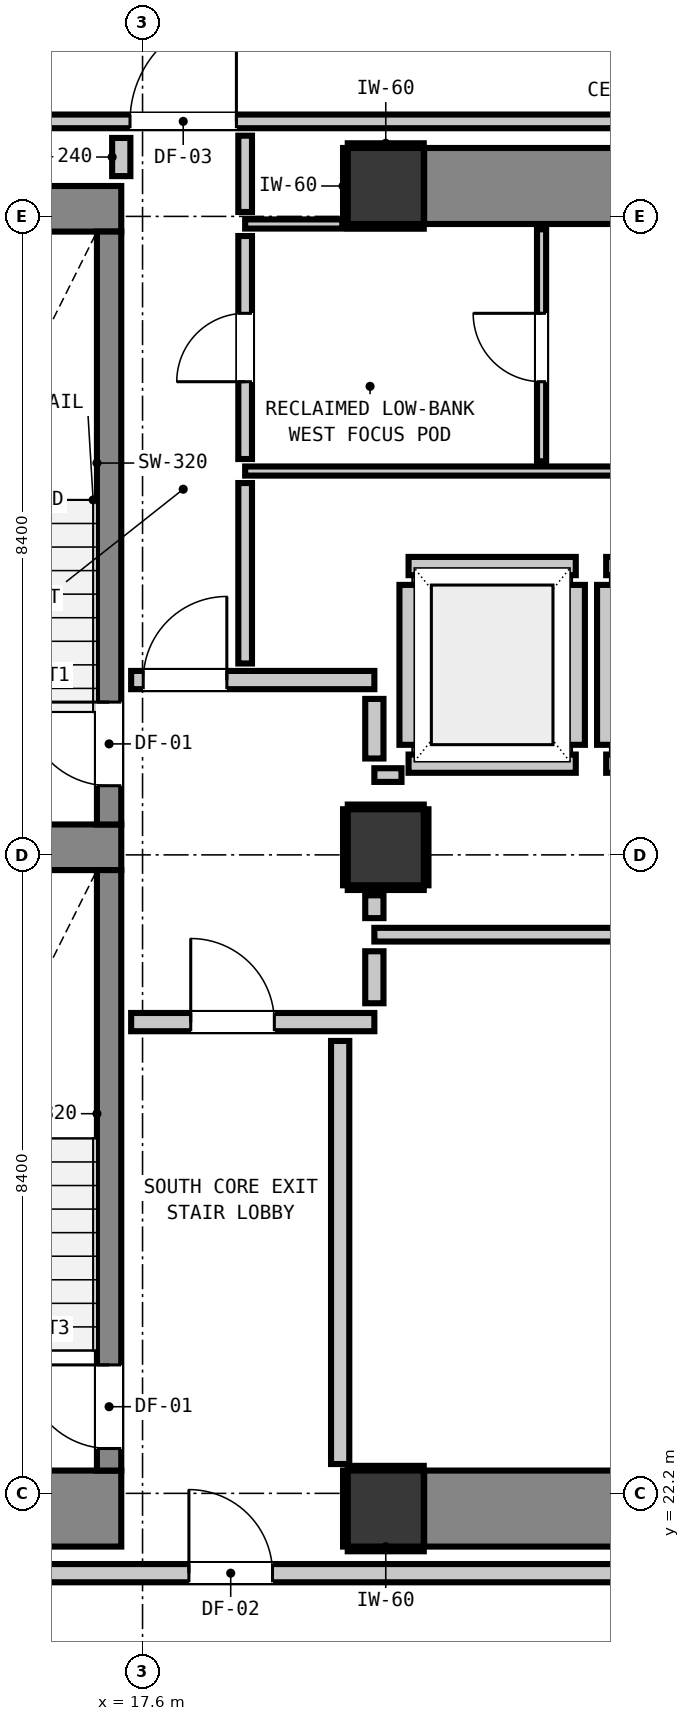
"""IFC4 building model, lengths in metres.
Left out: names, types, materials, properties, quantities, classifications, styles, units other than length and angle.
Written with IfcOpenShell. Run it as: python <this file> out.ifc"""

import sys

from ifc_helpers import new_model, si_unit, direction, frame, frame_2d, origin, origin_2d, place, context, subcontext, project, spatial, rectangle, extrude, element, fill, save


model = new_model("IFC4")
c1 = context("Model", 3, precision=1e-05, world=origin(), true_north=direction((0.0, 1.0)))
c2 = subcontext(c1, "Body", "Model", "MODEL_VIEW")
j1 = project(units=[si_unit("LENGTHUNIT", "METRE"), si_unit("PLANEANGLEUNIT", "RADIAN")], contexts=[c1])
p1 = place(None, origin())
s1 = spatial("IfcSite", under=j1, at=p1, CompositionType="ELEMENT")
p2 = place(p1, origin())
s2 = spatial("IfcBuilding", under=s1, at=p2, CompositionType="ELEMENT")
p3 = place(p2, frame((0.0, 0.0, 142.6)))
s3 = spatial("IfcBuildingStorey", under=s2, at=p3, CompositionType="ELEMENT", Elevation=142.6)
for number, where, z_axis, x_axis in (
    (1, (20.8, 22.0, 0.0), (0.0, 0.0, 1.0), (1.0, 0.0, 0.0)),
    (2, (20.8, 39.4, 0.0), (0.0, 0.0, 1.0), (1.0, 0.0, 0.0)),
):
    element("IfcColumn", number, at=place(p3, frame(where, z_axis=z_axis, x_axis=x_axis)), inside=s3, PredefinedType="COLUMN", context=c2, shape_type="SweptSolid", body=[
        extrude(rectangle(XDim=1.0, YDim=1.0, at=origin_2d()), origin(), (0.0, 0.0, 1.0), 3.32),
    ])
p4 = place(p3, frame((13.24, 22.0, 0.0), z_axis=(0.0, 0.0, 1.0), x_axis=(1.0, 0.0, 0.0)))
e3 = element("IfcWall", 3, at=p4, inside=s3, PredefinedType="SHEAR", context=c2, shape_type="SweptSolid", body=[
    extrude(rectangle(XDim=4.08, YDim=1.0, at=frame_2d((2.04, 0.0))), origin(), (0.0, 0.0, 1.0), 3.32),
])
p5 = place(p3, frame((13.24, 39.1, 0.0), z_axis=(0.0, 0.0, 1.0), x_axis=(1.0, 0.0, 0.0)))
e4 = element("IfcWall", 4, at=p5, inside=s3, PredefinedType="SHEAR", context=c2, shape_type="SweptSolid", body=[
    extrude(rectangle(XDim=4.08, YDim=0.6, at=frame_2d((2.04, 0.0))), origin(), (0.0, 0.0, 1.0), 3.32),
])
p6 = place(p3, frame((13.905, 30.7, 0.0), z_axis=(0.0, 0.0, 1.0), x_axis=(1.0, 0.0, 0.0)))
e5 = element("IfcWall", 5, at=p6, inside=s3, PredefinedType="SHEAR", context=c2, shape_type="SweptSolid", body=[
    extrude(rectangle(XDim=3.415, YDim=0.6, at=frame_2d((1.708, 0.0))), origin(), (0.0, 0.0, 1.0), 3.32),
])
for number, where, z_axis, x_axis in (
    (6, (21.305, 22.0, 0.0), (0.0, 0.0, 1.0), (1.0, 0.0, 0.0)),
    (7, (21.305, 39.4, 0.0), (0.0, 0.0, 1.0), (1.0, 0.0, 0.0)),
):
    element("IfcWall", number, at=place(p3, frame(where, z_axis=z_axis, x_axis=x_axis)), inside=s3, PredefinedType="SHEAR", context=c2, shape_type="SweptSolid", body=[
        extrude(rectangle(XDim=7.39, YDim=1.0, at=frame_2d((3.695, 0.0))), origin(), (0.0, 0.0, 1.0), 3.32),
    ])
p7 = place(p3, frame((17.16, 31.0, 0.0), z_axis=(0.0, 0.0, 1.0), x_axis=(0.0, 1.0, 0.0)))
e8 = element("IfcWall", 8, at=p7, inside=s3, PredefinedType="SHEAR", context=c2, shape_type="SweptSolid", body=[
    extrude(rectangle(XDim=7.8, YDim=0.32, at=frame_2d((3.9, 0.0))), origin(), (0.0, 0.0, 1.0), 3.32),
])
p8 = place(p7, frame((0.51, 0.0, 0.0)))
e9 = element("IfcOpeningElement", 9, at=p8, cuts=e8, PredefinedType="OPENING", context=c2, shape_type="SweptSolid", body=[
    extrude(rectangle(XDim=1.1, YDim=2.15, at=frame_2d((0.55, 1.075))), frame((0.0, 0.17, 0.0), z_axis=(0.0, -1.0, 0.0), x_axis=(1.0, 0.0, 0.0)), (0.0, 0.0, 1.0), 0.34),
])
p9 = place(p3, frame((17.16, 22.5, 0.0), z_axis=(0.0, 0.0, 1.0), x_axis=(0.0, 1.0, 0.0)))
e10 = element("IfcWall", 10, at=p9, inside=s3, PredefinedType="SHEAR", context=c2, shape_type="SweptSolid", body=[
    extrude(rectangle(XDim=7.9, YDim=0.32, at=frame_2d((3.95, 0.0))), origin(), (0.0, 0.0, 1.0), 3.32),
])
p10 = place(p9, frame((0.29, 0.0, 0.0)))
e11 = element("IfcOpeningElement", 11, at=p10, cuts=e10, PredefinedType="OPENING", context=c2, shape_type="SweptSolid", body=[
    extrude(rectangle(XDim=1.1, YDim=2.15, at=frame_2d((0.55, 1.075))), frame((0.0, 0.17, 0.0), z_axis=(0.0, -1.0, 0.0), x_axis=(1.0, 0.0, 0.0)), (0.0, 0.0, 1.0), 0.34),
])
p11 = place(p3, frame((20.8, 30.7, 0.0), z_axis=(0.0, 0.0, 1.0), x_axis=(1.0, 0.0, 0.0)))
e12 = element("IfcColumn", 12, at=p11, inside=s3, PredefinedType="COLUMN", context=c2, shape_type="SweptSolid", body=[
    extrude(rectangle(XDim=1.0, YDim=1.0, at=origin_2d()), origin(), (0.0, 0.0, 1.0), 3.32),
])
for number, where, z_axis, x_axis in (
    (13, (21.1, 31.8, 0.0), (0.0, 0.0, 1.0), (1.0, 0.0, 0.0)),
    (14, (21.1, 34.4, 0.0), (0.0, 0.0, 1.0), (1.0, 0.0, 0.0)),
):
    element("IfcWall", number, at=place(p3, frame(where, z_axis=z_axis, x_axis=x_axis)), inside=s3, PredefinedType="PARTITIONING", context=c2, shape_type="SweptSolid", body=[
        extrude(rectangle(XDim=2.2, YDim=0.24, at=frame_2d((1.1, 0.0))), origin(), (0.0, 0.0, 1.0), 2.9),
    ])
p12 = place(p3, frame((21.1, 32.048, 0.0), z_axis=(0.0, 0.0, 1.0), x_axis=(0.0, 1.0, 0.0)))
e15 = element("IfcWall", 15, at=p12, inside=s3, PredefinedType="PARTITIONING", context=c2, shape_type="SweptSolid", body=[
    extrude(rectangle(XDim=2.104, YDim=0.24, at=frame_2d((1.052, 0.0))), origin(), (0.0, 0.0, 1.0), 0.905),
])
p13 = place(p3, frame((23.3, 32.048, 0.0), z_axis=(0.0, 0.0, 1.0), x_axis=(0.0, 1.0, 0.0)))
e16 = element("IfcWall", 16, at=p13, inside=s3, PredefinedType="PARTITIONING", context=c2, shape_type="SweptSolid", body=[
    extrude(rectangle(XDim=2.104, YDim=0.24, at=frame_2d((1.052, 0.0))), origin(), (0.0, 0.0, 1.0), 2.9),
])
for number, where, z_axis, x_axis in (
    (17, (23.7, 31.8, 0.0), (0.0, 0.0, 1.0), (1.0, 0.0, 0.0)),
    (18, (23.7, 34.4, 0.0), (0.0, 0.0, 1.0), (1.0, 0.0, 0.0)),
):
    element("IfcWall", number, at=place(p3, frame(where, z_axis=z_axis, x_axis=x_axis)), inside=s3, PredefinedType="PARTITIONING", context=c2, shape_type="SweptSolid", body=[
        extrude(rectangle(XDim=2.2, YDim=0.24, at=frame_2d((1.1, 0.0))), origin(), (0.0, 0.0, 1.0), 2.9),
    ])
p14 = place(p3, frame((23.7, 32.048, 0.0), z_axis=(0.0, 0.0, 1.0), x_axis=(0.0, 1.0, 0.0)))
e19 = element("IfcWall", 19, at=p14, inside=s3, PredefinedType="PARTITIONING", context=c2, shape_type="SweptSolid", body=[
    extrude(rectangle(XDim=2.104, YDim=0.24, at=frame_2d((1.052, 0.0))), origin(), (0.0, 0.0, 1.0), 2.9),
])
p15 = place(p3, frame((9.407, 21.15, 0.0), z_axis=(0.0, 0.0, 1.0), x_axis=(1.0, 0.0, 0.0)))
e20 = element("IfcWall", 20, at=p15, inside=s3, PredefinedType="PARTITIONING", context=c2, shape_type="SweptSolid", body=[
    extrude(rectangle(XDim=39.386, YDim=0.24, at=frame_2d((19.693, 0.0))), origin(), (0.0, 0.0, 1.0), 2.9),
])
p16 = place(p15, frame((8.803, 0.0, 0.0)))
e21 = element("IfcOpeningElement", 21, at=p16, cuts=e20, PredefinedType="OPENING", context=c2, shape_type="SweptSolid", body=[
    extrude(rectangle(XDim=1.1, YDim=2.15, at=frame_2d((0.55, 1.075))), frame((0.0, 0.13, 0.0), z_axis=(0.0, -1.0, 0.0), x_axis=(1.0, 0.0, 0.0)), (0.0, 0.0, 1.0), 0.26),
])
p17 = place(p15, frame((1.192, 0.0, 0.0)))
e22 = element("IfcOpeningElement", 22, at=p17, cuts=e20, PredefinedType="OPENING", context=c2, shape_type="SweptSolid", body=[
    extrude(rectangle(XDim=1.4, YDim=2.15, at=frame_2d((0.7, 1.075))), frame((0.0, 0.13, 0.0), z_axis=(0.0, -1.0, 0.0), x_axis=(1.0, 0.0, 0.0)), (0.0, 0.0, 1.0), 0.26),
])
p18 = place(p15, frame((28.643, 0.0, 0.0)))
e23 = element("IfcOpeningElement", 23, at=p18, cuts=e20, PredefinedType="OPENING", context=c2, shape_type="SweptSolid", body=[
    extrude(rectangle(XDim=1.4, YDim=2.15, at=frame_2d((0.7, 1.075))), frame((0.0, 0.13, 0.0), z_axis=(0.0, -1.0, 0.0), x_axis=(1.0, 0.0, 0.0)), (0.0, 0.0, 1.0), 0.26),
])
p19 = place(p3, frame((17.45, 28.4, 0.0), z_axis=(0.0, 0.0, 1.0), x_axis=(1.0, 0.0, 0.0)))
e24 = element("IfcWall", 24, at=p19, inside=s3, PredefinedType="PARTITIONING", context=c2, shape_type="SweptSolid", body=[
    extrude(rectangle(XDim=3.2, YDim=0.24, at=frame_2d((1.6, 0.0))), origin(), (0.0, 0.0, 1.0), 2.9),
])
p20 = place(p19, frame((0.784, 0.0, 0.0)))
e25 = element("IfcOpeningElement", 25, at=p20, cuts=e24, PredefinedType="OPENING", context=c2, shape_type="SweptSolid", body=[
    extrude(rectangle(XDim=1.1, YDim=2.15, at=frame_2d((0.55, 1.075))), frame((0.0, 0.13, 0.0), z_axis=(0.0, -1.0, 0.0), x_axis=(1.0, 0.0, 0.0)), (0.0, 0.0, 1.0), 0.26),
])
p21 = place(p3, frame((17.45, 32.9, 0.0), z_axis=(0.0, 0.0, 1.0), x_axis=(1.0, 0.0, 0.0)))
e26 = element("IfcWall", 26, at=p21, inside=s3, PredefinedType="PARTITIONING", context=c2, shape_type="SweptSolid", body=[
    extrude(rectangle(XDim=3.2, YDim=0.24, at=frame_2d((1.6, 0.0))), origin(), (0.0, 0.0, 1.0), 2.9),
])
p22 = place(p21, frame((0.159, 0.0, 0.0)))
e27 = element("IfcOpeningElement", 27, at=p22, cuts=e26, PredefinedType="OPENING", context=c2, shape_type="SweptSolid", body=[
    extrude(rectangle(XDim=1.1, YDim=2.15, at=frame_2d((0.55, 1.075))), frame((0.0, 0.13, 0.0), z_axis=(0.0, -1.0, 0.0), x_axis=(1.0, 0.0, 0.0)), (0.0, 0.0, 1.0), 0.26),
])
p23 = place(p3, frame((20.65, 29.55, 0.0), z_axis=(0.0, 0.0, 1.0), x_axis=(1.0, 0.0, 0.0)))
e28 = element("IfcWall", 28, at=p23, inside=s3, PredefinedType="PARTITIONING", context=c2, shape_type="SweptSolid", body=[
    extrude(rectangle(XDim=9.325, YDim=0.18, at=frame_2d((4.663, 0.0))), origin(), (0.0, 0.0, 1.0), 2.9),
])
p24 = place(p3, frame((20.65, 31.65, 0.0), z_axis=(0.0, 0.0, 1.0), x_axis=(1.0, 0.0, 0.0)))
e29 = element("IfcWall", 29, at=p24, inside=s3, PredefinedType="PARTITIONING", context=c2, shape_type="SweptSolid", body=[
    extrude(rectangle(XDim=0.357, YDim=0.18, at=frame_2d((0.179, 0.0))), origin(), (0.0, 0.0, 1.0), 2.9),
])
p25 = place(p3, frame((9.407, 40.25, 0.0), z_axis=(0.0, 0.0, 1.0), x_axis=(1.0, 0.0, 0.0)))
e30 = element("IfcWall", 30, at=p25, inside=s3, PredefinedType="PARTITIONING", context=c2, shape_type="SweptSolid", body=[
    extrude(rectangle(XDim=39.386, YDim=0.18, at=frame_2d((19.693, 0.0))), origin(), (0.0, 0.0, 1.0), 2.9),
])
p26 = place(p25, frame((8.028, 0.0, 0.0)))
e31 = element("IfcOpeningElement", 31, at=p26, cuts=e30, PredefinedType="OPENING", context=c2, shape_type="SweptSolid", body=[
    extrude(rectangle(XDim=1.4, YDim=2.15, at=frame_2d((0.7, 1.075))), frame((0.0, 0.1, 0.0), z_axis=(0.0, -1.0, 0.0), x_axis=(1.0, 0.0, 0.0)), (0.0, 0.0, 1.0), 0.2),
])
p27 = place(p25, frame((1.192, 0.0, 0.0)))
e32 = element("IfcOpeningElement", 32, at=p27, cuts=e30, PredefinedType="OPENING", context=c2, shape_type="SweptSolid", body=[
    extrude(rectangle(XDim=1.4, YDim=2.15, at=frame_2d((0.7, 1.075))), frame((0.0, 0.1, 0.0), z_axis=(0.0, -1.0, 0.0), x_axis=(1.0, 0.0, 0.0)), (0.0, 0.0, 1.0), 0.2),
])
p28 = place(p25, frame((28.643, 0.0, 0.0)))
e33 = element("IfcOpeningElement", 33, at=p28, cuts=e30, PredefinedType="OPENING", context=c2, shape_type="SweptSolid", body=[
    extrude(rectangle(XDim=1.4, YDim=2.15, at=frame_2d((0.7, 1.075))), frame((0.0, 0.1, 0.0), z_axis=(0.0, -1.0, 0.0), x_axis=(1.0, 0.0, 0.0)), (0.0, 0.0, 1.0), 0.2),
])
p29 = place(p25, frame((34.394, 0.0, 0.0)))
e34 = element("IfcOpeningElement", 34, at=p29, cuts=e30, PredefinedType="OPENING", context=c2, shape_type="SweptSolid", body=[
    extrude(rectangle(XDim=0.9, YDim=2.1, at=frame_2d((0.45, 1.05))), frame((0.0, 0.1, 0.0), z_axis=(0.0, -1.0, 0.0), x_axis=(1.0, 0.0, 0.0)), (0.0, 0.0, 1.0), 0.2),
])
p30 = place(p3, frame((18.95, 35.65, 0.0), z_axis=(0.0, 0.0, 1.0), x_axis=(1.0, 0.0, 0.0)))
e35 = element("IfcWall", 35, at=p30, inside=s3, PredefinedType="PARTITIONING", context=c2, shape_type="SweptSolid", body=[
    extrude(rectangle(XDim=11.025, YDim=0.12, at=frame_2d((5.513, 0.0))), origin(), (0.0, 0.0, 1.0), 2.9),
])
p31 = place(p3, frame((18.95, 38.9, 0.0), z_axis=(0.0, 0.0, 1.0), x_axis=(1.0, 0.0, 0.0)))
e36 = element("IfcWall", 36, at=p31, inside=s3, PredefinedType="PARTITIONING", context=c2, shape_type="SweptSolid", body=[
    extrude(rectangle(XDim=1.278, YDim=0.12, at=frame_2d((0.639, 0.0))), origin(), (0.0, 0.0, 1.0), 0.905),
])
p32 = place(p3, frame((17.32, 39.53, 0.0), z_axis=(0.0, 0.0, 1.0), x_axis=(0.0, 1.0, 0.0)))
e37 = element("IfcWall", 37, at=p32, inside=s3, PredefinedType="PARTITIONING", context=c2, shape_type="SweptSolid", body=[
    extrude(rectangle(XDim=0.502, YDim=0.24, at=frame_2d((0.251, 0.0))), origin(), (0.0, 0.0, 1.0), 2.9),
])
p33 = place(p3, frame((20.2, 22.586, 0.0), z_axis=(0.0, 0.0, 1.0), x_axis=(0.0, 1.0, 0.0)))
e38 = element("IfcWall", 38, at=p33, inside=s3, PredefinedType="PARTITIONING", context=c2, shape_type="SweptSolid", body=[
    extrude(rectangle(XDim=5.566, YDim=0.24, at=frame_2d((2.783, 0.0))), origin(), (0.0, 0.0, 1.0), 0.905),
])
p34 = place(p3, frame((20.65, 28.648, 0.0), z_axis=(0.0, 0.0, 1.0), x_axis=(0.0, 1.0, 0.0)))
e39 = element("IfcWall", 39, at=p34, inside=s3, PredefinedType="PARTITIONING", context=c2, shape_type="SweptSolid", body=[
    extrude(rectangle(XDim=0.684, YDim=0.24, at=frame_2d((0.342, 0.0))), origin(), (0.0, 0.0, 1.0), 0.905),
])
p35 = place(p3, frame((20.65, 29.768, 0.0), z_axis=(0.0, 0.0, 1.0), x_axis=(0.0, 1.0, 0.0)))
e40 = element("IfcWall", 40, at=p35, inside=s3, PredefinedType="PARTITIONING", context=c2, shape_type="SweptSolid", body=[
    extrude(rectangle(XDim=0.3, YDim=0.24, at=frame_2d((0.15, 0.0))), origin(), (0.0, 0.0, 1.0), 0.905),
])
p36 = place(p3, frame((20.65, 31.868, 0.0), z_axis=(0.0, 0.0, 1.0), x_axis=(0.0, 1.0, 0.0)))
e41 = element("IfcWall", 41, at=p36, inside=s3, PredefinedType="PARTITIONING", context=c2, shape_type="SweptSolid", body=[
    extrude(rectangle(XDim=0.784, YDim=0.24, at=frame_2d((0.392, 0.0))), origin(), (0.0, 0.0, 1.0), 0.905),
])
p37 = place(p3, frame((18.95, 33.118, 0.0), z_axis=(0.0, 0.0, 1.0), x_axis=(0.0, 1.0, 0.0)))
e42 = element("IfcWall", 42, at=p37, inside=s3, PredefinedType="PARTITIONING", context=c2, shape_type="SweptSolid", body=[
    extrude(rectangle(XDim=2.374, YDim=0.18, at=frame_2d((1.187, 0.0))), origin(), (0.0, 0.0, 1.0), 2.9),
])
p38 = place(p3, frame((18.95, 35.808, 0.0), z_axis=(0.0, 0.0, 1.0), x_axis=(0.0, 1.0, 0.0)))
e43 = element("IfcWall", 43, at=p38, inside=s3, PredefinedType="PARTITIONING", context=c2, shape_type="SweptSolid", body=[
    extrude(rectangle(XDim=2.934, YDim=0.18, at=frame_2d((1.467, 0.0))), origin(), (0.0, 0.0, 1.0), 2.9),
])
p39 = place(p38, frame((1.017, 0.0, 0.0)))
e44 = element("IfcOpeningElement", 44, at=p39, cuts=e43, PredefinedType="OPENING", context=c2, shape_type="SweptSolid", body=[
    extrude(rectangle(XDim=0.9, YDim=2.1, at=frame_2d((0.45, 1.05))), frame((0.0, 0.1, 0.0), z_axis=(0.0, -1.0, 0.0), x_axis=(1.0, 0.0, 0.0)), (0.0, 0.0, 1.0), 0.2),
])
p40 = place(p3, frame((18.95, 39.058, 0.0), z_axis=(0.0, 0.0, 1.0), x_axis=(0.0, 1.0, 0.0)))
e45 = element("IfcWall", 45, at=p40, inside=s3, PredefinedType="PARTITIONING", context=c2, shape_type="SweptSolid", body=[
    extrude(rectangle(XDim=1.004, YDim=0.18, at=frame_2d((0.502, 0.0))), origin(), (0.0, 0.0, 1.0), 2.9),
])
p41 = place(p3, frame((22.85, 35.778, 0.0), z_axis=(0.0, 0.0, 1.0), x_axis=(0.0, 1.0, 0.0)))
e46 = element("IfcWall", 46, at=p41, inside=s3, PredefinedType="PARTITIONING", context=c2, shape_type="SweptSolid", body=[
    extrude(rectangle(XDim=3.052, YDim=0.12, at=frame_2d((1.526, 0.0))), origin(), (0.0, 0.0, 1.0), 2.9),
])
p42 = place(p41, frame((1.047, 0.0, 0.0)))
e47 = element("IfcOpeningElement", 47, at=p42, cuts=e46, PredefinedType="OPENING", context=c2, shape_type="SweptSolid", body=[
    extrude(rectangle(XDim=0.9, YDim=2.1, at=frame_2d((0.45, 1.05))), frame((0.0, 0.07, 0.0), z_axis=(0.0, -1.0, 0.0), x_axis=(1.0, 0.0, 0.0)), (0.0, 0.0, 1.0), 0.14),
])
for number, where, z_axis, x_axis in (
    (48, (20.3, 21.468, 0.0), (0.0, 0.0, 1.0), (1.0, 0.0, 0.0)),
    (49, (20.3, 22.532, 0.0), (0.0, 0.0, 1.0), (1.0, 0.0, 0.0)),
    (50, (20.268, 21.5, 0.0), (0.0, 0.0, 1.0), (0.0, 1.0, 0.0)),
    (51, (20.3, 38.868, 0.0), (0.0, 0.0, 1.0), (1.0, 0.0, 0.0)),
    (52, (20.3, 39.932, 0.0), (0.0, 0.0, 1.0), (1.0, 0.0, 0.0)),
    (53, (20.268, 38.9, 0.0), (0.0, 0.0, 1.0), (0.0, 1.0, 0.0)),
    (54, (20.3, 30.168, 0.0), (0.0, 0.0, 1.0), (1.0, 0.0, 0.0)),
    (55, (20.3, 31.232, 0.0), (0.0, 0.0, 1.0), (1.0, 0.0, 0.0)),
    (56, (20.268, 30.2, 0.0), (0.0, 0.0, 1.0), (0.0, 1.0, 0.0)),
    (57, (21.332, 30.2, 0.0), (0.0, 0.0, 1.0), (0.0, 1.0, 0.0)),
):
    element("IfcWall", number, at=place(p3, frame(where, z_axis=z_axis, x_axis=x_axis)), inside=s3, PredefinedType="PARTITIONING", context=c2, shape_type="SweptSolid", body=[
        extrude(rectangle(XDim=1.0, YDim=0.06, at=frame_2d((0.5, 0.0))), origin(), (0.0, 0.0, 1.0), 0.905),
    ])
p43 = place(p8, origin())
e58 = element("IfcDoor", 58, at=p43, inside=s3, OperationType="SINGLE_SWING_RIGHT", PredefinedType="DOOR", context=c2, shape_type="SweptSolid", body=[
    extrude(rectangle(XDim=1.1, YDim=2.15, at=frame_2d((0.55, 1.075))), frame((0.0, 0.025, 0.0), z_axis=(0.0, -1.0, 0.0), x_axis=(1.0, 0.0, 0.0)), (0.0, 0.0, 1.0), 0.05),
])
fill(e9, e58)
p44 = place(p10, origin())
e59 = element("IfcDoor", 59, at=p44, inside=s3, OperationType="SINGLE_SWING_RIGHT", PredefinedType="DOOR", context=c2, shape_type="SweptSolid", body=[
    extrude(rectangle(XDim=1.1, YDim=2.15, at=frame_2d((0.55, 1.075))), frame((0.0, 0.025, 0.0), z_axis=(0.0, -1.0, 0.0), x_axis=(1.0, 0.0, 0.0)), (0.0, 0.0, 1.0), 0.05),
])
fill(e11, e59)
p45 = place(p20, origin())
e60 = element("IfcDoor", 60, at=p45, inside=s3, OperationType="SINGLE_SWING_LEFT", PredefinedType="DOOR", context=c2, shape_type="SweptSolid", body=[
    extrude(rectangle(XDim=1.1, YDim=2.15, at=frame_2d((0.55, 1.075))), frame((0.0, 0.025, 0.0), z_axis=(0.0, -1.0, 0.0), x_axis=(1.0, 0.0, 0.0)), (0.0, 0.0, 1.0), 0.05),
])
fill(e25, e60)
p46 = place(p22, origin())
e61 = element("IfcDoor", 61, at=p46, inside=s3, OperationType="SINGLE_SWING_RIGHT", PredefinedType="DOOR", context=c2, shape_type="SweptSolid", body=[
    extrude(rectangle(XDim=1.1, YDim=2.15, at=frame_2d((0.55, 1.075))), frame((0.0, 0.025, 0.0), z_axis=(0.0, -1.0, 0.0), x_axis=(1.0, 0.0, 0.0)), (0.0, 0.0, 1.0), 0.05),
])
fill(e27, e61)
p47 = place(p16, origin())
e62 = element("IfcDoor", 62, at=p47, inside=s3, OperationType="SINGLE_SWING_LEFT", PredefinedType="DOOR", context=c2, shape_type="SweptSolid", body=[
    extrude(rectangle(XDim=1.1, YDim=2.15, at=frame_2d((0.55, 1.075))), frame((0.0, 0.025, 0.0), z_axis=(0.0, -1.0, 0.0), x_axis=(1.0, 0.0, 0.0)), (0.0, 0.0, 1.0), 0.05),
])
fill(e21, e62)
p48 = place(p26, origin())
e63 = element("IfcDoor", 63, at=p48, inside=s3, OperationType="SINGLE_SWING_RIGHT", PredefinedType="DOOR", context=c2, shape_type="SweptSolid", body=[
    extrude(rectangle(XDim=1.4, YDim=2.15, at=frame_2d((0.7, 1.075))), frame((0.0, 0.025, 0.0), z_axis=(0.0, -1.0, 0.0), x_axis=(1.0, 0.0, 0.0)), (0.0, 0.0, 1.0), 0.05),
])
fill(e31, e63)
p49 = place(p39, origin())
e64 = element("IfcDoor", 64, at=p49, inside=s3, OperationType="SINGLE_SWING_LEFT", PredefinedType="DOOR", context=c2, shape_type="SweptSolid", body=[
    extrude(rectangle(XDim=0.9, YDim=2.1, at=frame_2d((0.45, 1.05))), frame((0.0, 0.025, 0.0), z_axis=(0.0, -1.0, 0.0), x_axis=(1.0, 0.0, 0.0)), (0.0, 0.0, 1.0), 0.05),
])
fill(e44, e64)
p50 = place(p42, origin())
e65 = element("IfcDoor", 65, at=p50, inside=s3, OperationType="SINGLE_SWING_RIGHT", PredefinedType="DOOR", context=c2, shape_type="SweptSolid", body=[
    extrude(rectangle(XDim=0.9, YDim=2.1, at=frame_2d((0.45, 1.05))), frame((0.0, 0.025, 0.0), z_axis=(0.0, -1.0, 0.0), x_axis=(1.0, 0.0, 0.0)), (0.0, 0.0, 1.0), 0.05),
])
fill(e47, e65)
save(model, sys.argv[1])
